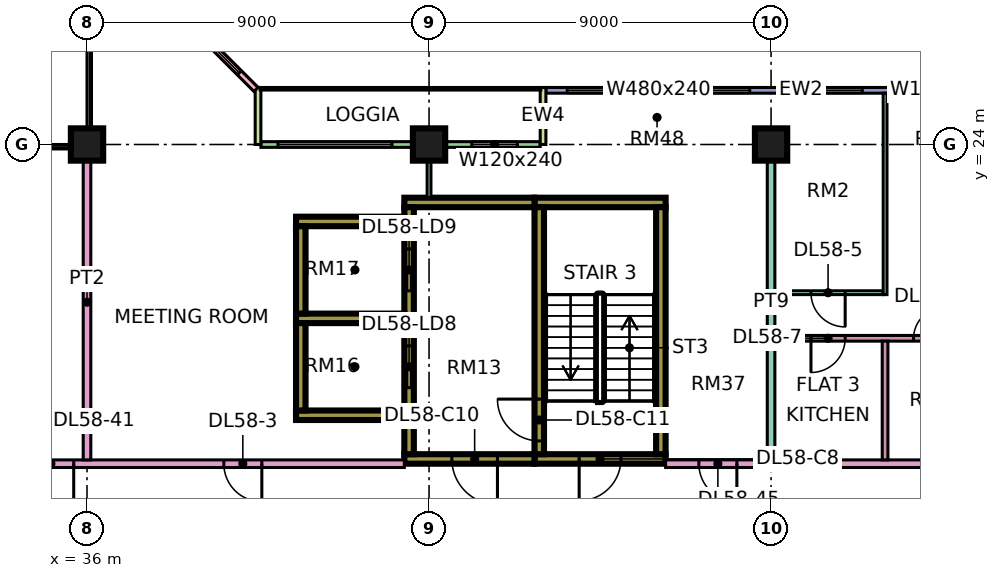
"""IFC4 building model, lengths in metres.
Left out: names, types, materials, properties, quantities, classifications, styles, units other than length and angle.
Written with IfcOpenShell. Run it as: python <this file> out.ifc"""

import sys

from ifc_helpers import new_model, si_unit, direction, frame, frame_2d, origin, origin_2d, place, context, subcontext, project, spatial, rectangle, extrude, element, fill, save


model = new_model("IFC4")
c1 = context("Model", 3, precision=1e-05, world=origin(), true_north=direction((0.0, 1.0)))
c2 = subcontext(c1, "Body", "Model", "MODEL_VIEW")
j1 = project(units=[si_unit("LENGTHUNIT", "METRE"), si_unit("PLANEANGLEUNIT", "RADIAN")], contexts=[c1])
p1 = place(None, origin())
s1 = spatial("IfcSite", under=j1, at=p1, CompositionType="ELEMENT")
p2 = place(p1, origin())
s2 = spatial("IfcBuilding", under=s1, at=p2, CompositionType="ELEMENT")
p3 = place(p2, frame((0.0, 0.0, 245.4)))
s3 = spatial("IfcBuildingStorey", under=s2, at=p3, CompositionType="ELEMENT", Elevation=245.4)
for number, where, z_axis, x_axis in (
    (1, (36.0, 24.0, 0.0), (0.0, 0.0, 1.0), (1.0, 0.0, 0.0)),
    (2, (45.0, 24.0, 0.0), (0.0, 0.0, 1.0), (1.0, 0.0, 0.0)),
    (3, (54.0, 24.0, 0.0), (0.0, 0.0, 1.0), (1.0, 0.0, 0.0)),
):
    element("IfcColumn", number, at=place(p3, frame(where, z_axis=z_axis, x_axis=x_axis)), inside=s3, PredefinedType="COLUMN", context=c2, shape_type="SweptSolid", body=[
        extrude(rectangle(XDim=0.85, YDim=0.85, at=origin_2d()), origin(), (0.0, 0.0, 1.0), 3.75),
    ])
p4 = place(p3, frame((47.775, 15.725, 0.0), z_axis=(0.0, 0.0, 1.0), x_axis=(1.0, 0.0, 0.0)))
e4 = element("IfcWall", 4, at=p4, inside=s3, PredefinedType="SHEAR", context=c2, shape_type="SweptSolid", body=[
    extrude(rectangle(XDim=3.45, YDim=0.25, at=frame_2d((1.725, 0.0))), origin(), (0.0, 0.0, 1.0), 3.75),
])
p5 = place(p4, frame((1.175, 0.0, 0.0)))
e5 = element("IfcOpeningElement", 5, at=p5, cuts=e4, PredefinedType="OPENING", context=c2, shape_type="SweptSolid", body=[
    extrude(rectangle(XDim=1.1, YDim=2.2, at=frame_2d((0.55, 1.1))), frame((0.0, 0.135, 0.0), z_axis=(0.0, -1.0, 0.0), x_axis=(1.0, 0.0, 0.0)), (0.0, 0.0, 1.0), 0.27),
])
p6 = place(p3, frame((47.775, 22.475, 0.0), z_axis=(0.0, 0.0, 1.0), x_axis=(1.0, 0.0, 0.0)))
e6 = element("IfcWall", 6, at=p6, inside=s3, PredefinedType="SHEAR", context=c2, shape_type="SweptSolid", body=[
    extrude(rectangle(XDim=3.45, YDim=0.25, at=frame_2d((1.725, 0.0))), origin(), (0.0, 0.0, 1.0), 3.75),
])
p7 = place(p3, frame((47.9, 15.85, 0.0), z_axis=(0.0, 0.0, 1.0), x_axis=(0.0, 1.0, 0.0)))
e7 = element("IfcWall", 7, at=p7, inside=s3, PredefinedType="SHEAR", context=c2, shape_type="SweptSolid", body=[
    extrude(rectangle(XDim=6.5, YDim=0.25, at=frame_2d((3.25, 0.0))), origin(), (0.0, 0.0, 1.0), 3.75),
])
p8 = place(p7, frame((0.35, 0.0, 0.0)))
e8 = element("IfcOpeningElement", 8, at=p8, cuts=e7, PredefinedType="OPENING", context=c2, shape_type="SweptSolid", body=[
    extrude(rectangle(XDim=1.1, YDim=2.2, at=frame_2d((0.55, 1.1))), frame((0.0, 0.135, 0.0), z_axis=(0.0, -1.0, 0.0), x_axis=(1.0, 0.0, 0.0)), (0.0, 0.0, 1.0), 0.27),
])
p9 = place(p3, frame((51.1, 15.85, 0.0), z_axis=(0.0, 0.0, 1.0), x_axis=(0.0, 1.0, 0.0)))
e9 = element("IfcWall", 9, at=p9, inside=s3, PredefinedType="SHEAR", context=c2, shape_type="SweptSolid", body=[
    extrude(rectangle(XDim=6.5, YDim=0.25, at=frame_2d((3.25, 0.0))), origin(), (0.0, 0.0, 1.0), 3.75),
])
p10 = place(p3, frame((44.35, 15.725, 0.0), z_axis=(0.0, 0.0, 1.0), x_axis=(1.0, 0.0, 0.0)))
e10 = element("IfcWall", 10, at=p10, inside=s3, PredefinedType="SHEAR", context=c2, shape_type="SweptSolid", body=[
    extrude(rectangle(XDim=3.425, YDim=0.25, at=frame_2d((1.712, 0.0))), origin(), (0.0, 0.0, 1.0), 3.75),
])
p11 = place(p10, frame((1.25, 0.0, 0.0)))
e11 = element("IfcOpeningElement", 11, at=p11, cuts=e10, PredefinedType="OPENING", context=c2, shape_type="SweptSolid", body=[
    extrude(rectangle(XDim=1.2, YDim=2.2, at=frame_2d((0.6, 1.1))), frame((0.0, 0.135, 0.0), z_axis=(0.0, -1.0, 0.0), x_axis=(1.0, 0.0, 0.0)), (0.0, 0.0, 1.0), 0.27),
])
p12 = place(p3, frame((44.35, 22.475, 0.0), z_axis=(0.0, 0.0, 1.0), x_axis=(1.0, 0.0, 0.0)))
e12 = element("IfcWall", 12, at=p12, inside=s3, PredefinedType="SHEAR", context=c2, shape_type="SweptSolid", body=[
    extrude(rectangle(XDim=3.425, YDim=0.25, at=frame_2d((1.712, 0.0))), origin(), (0.0, 0.0, 1.0), 3.75),
])
p13 = place(p3, frame((44.475, 15.85, 0.0), z_axis=(0.0, 0.0, 1.0), x_axis=(0.0, 1.0, 0.0)))
e13 = element("IfcWall", 13, at=p13, inside=s3, PredefinedType="SHEAR", context=c2, shape_type="SweptSolid", body=[
    extrude(rectangle(XDim=6.5, YDim=0.25, at=frame_2d((3.25, 0.0))), origin(), (0.0, 0.0, 1.0), 3.75),
])
p14 = place(p13, frame((1.75, 0.0, 0.0)))
e14 = element("IfcOpeningElement", 14, at=p14, cuts=e13, PredefinedType="OPENING", context=c2, shape_type="SweptSolid", body=[
    extrude(rectangle(XDim=1.1, YDim=2.2, at=frame_2d((0.55, 1.1))), frame((0.0, 0.135, 0.0), z_axis=(0.0, -1.0, 0.0), x_axis=(1.0, 0.0, 0.0)), (0.0, 0.0, 1.0), 0.27),
])
p15 = place(p13, frame((4.3, 0.0, 0.0)))
e15 = element("IfcOpeningElement", 15, at=p15, cuts=e13, PredefinedType="OPENING", context=c2, shape_type="SweptSolid", body=[
    extrude(rectangle(XDim=1.1, YDim=2.2, at=frame_2d((0.55, 1.1))), frame((0.0, 0.135, 0.0), z_axis=(0.0, -1.0, 0.0), x_axis=(1.0, 0.0, 0.0)), (0.0, 0.0, 1.0), 0.27),
])
for number, where, z_axis, x_axis in (
    (16, (41.5, 16.875, 0.0), (0.0, 0.0, 1.0), (1.0, 0.0, 0.0)),
    (17, (41.5, 19.425, 0.0), (0.0, 0.0, 1.0), (1.0, 0.0, 0.0)),
    (18, (41.5, 21.975, 0.0), (0.0, 0.0, 1.0), (1.0, 0.0, 0.0)),
):
    element("IfcWall", number, at=place(p3, frame(where, z_axis=z_axis, x_axis=x_axis)), inside=s3, PredefinedType="SHEAR", context=c2, shape_type="SweptSolid", body=[
        extrude(rectangle(XDim=2.85, YDim=0.25, at=frame_2d((1.425, 0.0))), origin(), (0.0, 0.0, 1.0), 3.75),
    ])
for number, where, z_axis, x_axis in (
    (19, (41.625, 17.0, 0.0), (0.0, 0.0, 1.0), (0.0, 1.0, 0.0)),
    (20, (41.625, 19.55, 0.0), (0.0, 0.0, 1.0), (0.0, 1.0, 0.0)),
):
    element("IfcWall", number, at=place(p3, frame(where, z_axis=z_axis, x_axis=x_axis)), inside=s3, PredefinedType="SHEAR", context=c2, shape_type="SweptSolid", body=[
        extrude(rectangle(XDim=2.3, YDim=0.25, at=frame_2d((1.15, 0.0))), origin(), (0.0, 0.0, 1.0), 3.75),
    ])
p16 = place(p3, frame((61.5, 25.425, 0.0), z_axis=(0.0, 0.0, 1.0), x_axis=(-1.0, 0.0, 0.0)))
e21 = element("IfcWall", 21, at=p16, inside=s3, PredefinedType="SOLIDWALL", context=c2, shape_type="SweptSolid", body=[
    extrude(rectangle(XDim=13.425, YDim=0.15, at=frame_2d((6.712, 0.0))), origin(), (0.0, 0.0, 1.0), 3.35),
])
p17 = place(p16, frame((0.3, 0.0, 0.45)))
e22 = element("IfcOpeningElement", 22, at=p17, cuts=e21, PredefinedType="OPENING", context=c2, shape_type="SweptSolid", body=[
    extrude(rectangle(XDim=0.9, YDim=2.4, at=frame_2d((0.45, 1.2))), frame((0.0, 0.085, 0.0), z_axis=(0.0, -1.0, 0.0), x_axis=(1.0, 0.0, 0.0)), (0.0, 0.0, 1.0), 0.17),
])
p18 = place(p16, frame((2.1, 0.0, 0.45)))
e23 = element("IfcOpeningElement", 23, at=p18, cuts=e21, PredefinedType="OPENING", context=c2, shape_type="SweptSolid", body=[
    extrude(rectangle(XDim=1.8, YDim=2.4, at=frame_2d((0.9, 1.2))), frame((0.0, 0.085, 0.0), z_axis=(0.0, -1.0, 0.0), x_axis=(1.0, 0.0, 0.0)), (0.0, 0.0, 1.0), 0.17),
])
p19 = place(p16, frame((5.1, 0.0, 0.45)))
e24 = element("IfcOpeningElement", 24, at=p19, cuts=e21, PredefinedType="OPENING", context=c2, shape_type="SweptSolid", body=[
    extrude(rectangle(XDim=1.8, YDim=2.4, at=frame_2d((0.9, 1.2))), frame((0.0, 0.085, 0.0), z_axis=(0.0, -1.0, 0.0), x_axis=(1.0, 0.0, 0.0)), (0.0, 0.0, 1.0), 0.17),
])
p20 = place(p16, frame((8.062, 0.0, 0.45)))
e25 = element("IfcOpeningElement", 25, at=p20, cuts=e21, PredefinedType="OPENING", context=c2, shape_type="SweptSolid", body=[
    extrude(rectangle(XDim=4.8, YDim=2.4, at=frame_2d((2.4, 1.2))), frame((0.0, 0.085, 0.0), z_axis=(0.0, -1.0, 0.0), x_axis=(1.0, 0.0, 0.0)), (0.0, 0.0, 1.0), 0.17),
])
p21 = place(p3, frame((47.925, 24.0, 0.0), z_axis=(0.0, 0.0, 1.0), x_axis=(-1.0, 0.0, 0.0)))
e26 = element("IfcWall", 26, at=p21, inside=s3, PredefinedType="SOLIDWALL", context=c2, shape_type="SweptSolid", body=[
    extrude(rectangle(XDim=7.35, YDim=0.15, at=frame_2d((3.675, 0.0))), origin(), (0.0, 0.0, 1.0), 3.35),
])
p22 = place(p21, frame((0.6, 0.0, 0.45)))
e27 = element("IfcOpeningElement", 27, at=p22, cuts=e26, PredefinedType="OPENING", context=c2, shape_type="SweptSolid", body=[
    extrude(rectangle(XDim=1.2, YDim=2.4, at=frame_2d((0.6, 1.2))), frame((0.0, 0.085, 0.0), z_axis=(0.0, -1.0, 0.0), x_axis=(1.0, 0.0, 0.0)), (0.0, 0.0, 1.0), 0.17),
])
p23 = place(p21, frame((3.9, 0.0, 0.45)))
e28 = element("IfcOpeningElement", 28, at=p23, cuts=e26, PredefinedType="OPENING", context=c2, shape_type="SweptSolid", body=[
    extrude(rectangle(XDim=3.0, YDim=2.4, at=frame_2d((1.5, 1.2))), frame((0.0, 0.085, 0.0), z_axis=(0.0, -1.0, 0.0), x_axis=(1.0, 0.0, 0.0)), (0.0, 0.0, 1.0), 0.17),
])
for number, where, z_axis, x_axis in (
    (29, (48.0, 25.5, 0.0), (0.0, 0.0, 1.0), (0.0, -1.0, 0.0)),
    (30, (40.5, 25.5, 0.0), (0.0, 0.0, 1.0), (0.0, -1.0, 0.0)),
):
    element("IfcWall", number, at=place(p3, frame(where, z_axis=z_axis, x_axis=x_axis)), inside=s3, PredefinedType="SOLIDWALL", context=c2, shape_type="SweptSolid", body=[
        extrude(rectangle(XDim=1.5, YDim=0.15, at=frame_2d((0.75, 0.0))), origin(), (0.0, 0.0, 1.0), 3.35),
    ])
p24 = place(p3, frame((40.447, 25.447, 0.0), z_axis=(0.0, 0.0, 1.0), x_axis=(-0.707106781187, 0.707106781187, 0.0)))
e31 = element("IfcWall", 31, at=p24, inside=s3, PredefinedType="SOLIDWALL", context=c2, shape_type="SweptSolid", body=[
    extrude(rectangle(XDim=4.243, YDim=0.15, at=frame_2d((2.121, 0.0))), origin(), (0.0, 0.0, 1.0), 3.35),
])
p25 = place(p24, frame((0.621, 0.0, 0.45)))
e32 = element("IfcOpeningElement", 32, at=p25, cuts=e31, PredefinedType="OPENING", context=c2, shape_type="SweptSolid", body=[
    extrude(rectangle(XDim=3.0, YDim=2.4, at=frame_2d((1.5, 1.2))), frame((0.0, 0.085, 0.0), z_axis=(0.0, -1.0, 0.0), x_axis=(1.0, 0.0, 0.0)), (0.0, 0.0, 1.0), 0.17),
])
p26 = place(p3, frame((34.0, 15.6, 0.0), z_axis=(0.0, 0.0, 1.0), x_axis=(1.0, 0.0, 0.0)))
e33 = element("IfcWall", 33, at=p26, inside=s3, PredefinedType="PARTITIONING", context=c2, shape_type="SweptSolid", body=[
    extrude(rectangle(XDim=10.35, YDim=0.2, at=frame_2d((5.175, 0.0))), origin(), (0.0, 0.0, 1.0), 3.35),
])
p27 = place(p26, frame((5.6, 0.0, 0.0)))
e34 = element("IfcOpeningElement", 34, at=p27, cuts=e33, PredefinedType="OPENING", context=c2, shape_type="SweptSolid", body=[
    extrude(rectangle(XDim=1.0, YDim=2.1, at=frame_2d((0.5, 1.05))), frame((0.0, 0.11, 0.0), z_axis=(0.0, -1.0, 0.0), x_axis=(1.0, 0.0, 0.0)), (0.0, 0.0, 1.0), 0.22),
])
p28 = place(p26, frame((0.45, 0.0, 0.0)))
e35 = element("IfcOpeningElement", 35, at=p28, cuts=e33, PredefinedType="OPENING", context=c2, shape_type="SweptSolid", body=[
    extrude(rectangle(XDim=1.2, YDim=2.1, at=frame_2d((0.6, 1.05))), frame((0.0, 0.11, 0.0), z_axis=(0.0, -1.0, 0.0), x_axis=(1.0, 0.0, 0.0)), (0.0, 0.0, 1.0), 0.22),
])
p29 = place(p3, frame((36.0, 15.7, 0.0), z_axis=(0.0, 0.0, 1.0), x_axis=(0.0, 1.0, 0.0)))
e36 = element("IfcWall", 36, at=p29, inside=s3, PredefinedType="PARTITIONING", context=c2, shape_type="SweptSolid", body=[
    extrude(rectangle(XDim=8.3, YDim=0.2, at=frame_2d((4.15, 0.0))), origin(), (0.0, 0.0, 1.0), 3.35),
])
p30 = place(p3, frame((45.0, 22.6, 0.0), z_axis=(0.0, 0.0, 1.0), x_axis=(0.0, 1.0, 0.0)))
e37 = element("IfcWall", 37, at=p30, inside=s3, PredefinedType="PARTITIONING", context=c2, shape_type="SweptSolid", body=[
    extrude(rectangle(XDim=1.326, YDim=0.1, at=frame_2d((0.663, 0.0))), origin(), (0.0, 0.0, 1.0), 3.35),
])
p31 = place(p3, frame((51.225, 15.6, 0.0), z_axis=(0.0, 0.0, 1.0), x_axis=(1.0, 0.0, 0.0)))
e38 = element("IfcWall", 38, at=p31, inside=s3, PredefinedType="PARTITIONING", context=c2, shape_type="SweptSolid", body=[
    extrude(rectangle(XDim=11.701, YDim=0.2, at=frame_2d((5.851, 0.0))), origin(), (0.0, 0.0, 1.0), 3.35),
])
p32 = place(p31, frame((9.425, 0.0, 0.0)))
e39 = element("IfcOpeningElement", 39, at=p32, cuts=e38, PredefinedType="OPENING", context=c2, shape_type="SweptSolid", body=[
    extrude(rectangle(XDim=1.0, YDim=2.1, at=frame_2d((0.5, 1.05))), frame((0.0, 0.11, 0.0), z_axis=(0.0, -1.0, 0.0), x_axis=(1.0, 0.0, 0.0)), (0.0, 0.0, 1.0), 0.22),
])
p33 = place(p31, frame((0.875, 0.0, 0.0)))
e40 = element("IfcOpeningElement", 40, at=p33, cuts=e38, PredefinedType="OPENING", context=c2, shape_type="SweptSolid", body=[
    extrude(rectangle(XDim=1.0, YDim=2.1, at=frame_2d((0.5, 1.05))), frame((0.0, 0.11, 0.0), z_axis=(0.0, -1.0, 0.0), x_axis=(1.0, 0.0, 0.0)), (0.0, 0.0, 1.0), 0.22),
])
p34 = place(p3, frame((54.0, 15.7, 0.0), z_axis=(0.0, 0.0, 1.0), x_axis=(0.0, 1.0, 0.0)))
e41 = element("IfcWall", 41, at=p34, inside=s3, PredefinedType="PARTITIONING", context=c2, shape_type="SweptSolid", body=[
    extrude(rectangle(XDim=8.3, YDim=0.2, at=frame_2d((4.15, 0.0))), origin(), (0.0, 0.0, 1.0), 3.35),
])
p35 = place(p3, frame((54.1, 18.9, 0.0), z_axis=(0.0, 0.0, 1.0), x_axis=(1.0, 0.0, 0.0)))
e42 = element("IfcWall", 42, at=p35, inside=s3, PredefinedType="PARTITIONING", context=c2, shape_type="SweptSolid", body=[
    extrude(rectangle(XDim=5.375, YDim=0.15, at=frame_2d((2.688, 0.0))), origin(), (0.0, 0.0, 1.0), 3.35),
])
p36 = place(p35, frame((3.65, 0.0, 0.0)))
e43 = element("IfcOpeningElement", 43, at=p36, cuts=e42, PredefinedType="OPENING", context=c2, shape_type="SweptSolid", body=[
    extrude(rectangle(XDim=0.8, YDim=2.1, at=frame_2d((0.4, 1.05))), frame((0.0, 0.085, 0.0), z_axis=(0.0, -1.0, 0.0), x_axis=(1.0, 0.0, 0.0)), (0.0, 0.0, 1.0), 0.17),
])
p37 = place(p35, frame((0.95, 0.0, 0.0)))
e44 = element("IfcOpeningElement", 44, at=p37, cuts=e42, PredefinedType="OPENING", context=c2, shape_type="SweptSolid", body=[
    extrude(rectangle(XDim=0.9, YDim=2.1, at=frame_2d((0.45, 1.05))), frame((0.0, 0.085, 0.0), z_axis=(0.0, -1.0, 0.0), x_axis=(1.0, 0.0, 0.0)), (0.0, 0.0, 1.0), 0.17),
])
p38 = place(p3, frame((54.1, 20.1, 0.0), z_axis=(0.0, 0.0, 1.0), x_axis=(1.0, 0.0, 0.0)))
e45 = element("IfcWall", 45, at=p38, inside=s3, PredefinedType="PARTITIONING", context=c2, shape_type="SweptSolid", body=[
    extrude(rectangle(XDim=2.85, YDim=0.1, at=frame_2d((1.425, 0.0))), origin(), (0.0, 0.0, 1.0), 3.35),
])
p39 = place(p38, frame((0.95, 0.0, 0.0)))
e46 = element("IfcOpeningElement", 46, at=p39, cuts=e45, PredefinedType="OPENING", context=c2, shape_type="SweptSolid", body=[
    extrude(rectangle(XDim=0.9, YDim=2.1, at=frame_2d((0.45, 1.05))), frame((0.0, 0.06, 0.0), z_axis=(0.0, -1.0, 0.0), x_axis=(1.0, 0.0, 0.0)), (0.0, 0.0, 1.0), 0.12),
])
p40 = place(p3, frame((57.0, 15.7, 0.0), z_axis=(0.0, 0.0, 1.0), x_axis=(0.0, 1.0, 0.0)))
e47 = element("IfcWall", 47, at=p40, inside=s3, PredefinedType="PARTITIONING", context=c2, shape_type="SweptSolid", body=[
    extrude(rectangle(XDim=3.125, YDim=0.15, at=frame_2d((1.562, 0.0))), origin(), (0.0, 0.0, 1.0), 3.35),
])
p41 = place(p3, frame((57.0, 20.05, 0.0), z_axis=(0.0, 0.0, 1.0), x_axis=(0.0, 1.0, 0.0)))
e48 = element("IfcWall", 48, at=p41, inside=s3, PredefinedType="PARTITIONING", context=c2, shape_type="SweptSolid", body=[
    extrude(rectangle(XDim=5.3, YDim=0.1, at=frame_2d((2.65, 0.0))), origin(), (0.0, 0.0, 1.0), 3.35),
])
p42 = place(p18, origin())
e49 = element("IfcWindow", 49, at=p42, inside=s3, PartitioningType="SINGLE_PANEL", PredefinedType="WINDOW", context=c2, shape_type="SweptSolid", body=[
    extrude(rectangle(XDim=1.8, YDim=2.4, at=frame_2d((0.9, 1.2))), frame((0.0, 0.03, 0.0), z_axis=(0.0, -1.0, 0.0), x_axis=(1.0, 0.0, 0.0)), (0.0, 0.0, 1.0), 0.06),
])
fill(e23, e49)
p43 = place(p19, origin())
e50 = element("IfcWindow", 50, at=p43, inside=s3, PartitioningType="SINGLE_PANEL", PredefinedType="WINDOW", context=c2, shape_type="SweptSolid", body=[
    extrude(rectangle(XDim=1.8, YDim=2.4, at=frame_2d((0.9, 1.2))), frame((0.0, 0.03, 0.0), z_axis=(0.0, -1.0, 0.0), x_axis=(1.0, 0.0, 0.0)), (0.0, 0.0, 1.0), 0.06),
])
fill(e24, e50)
p44 = place(p20, origin())
e51 = element("IfcWindow", 51, at=p44, inside=s3, PartitioningType="SINGLE_PANEL", PredefinedType="WINDOW", context=c2, shape_type="SweptSolid", body=[
    extrude(rectangle(XDim=4.8, YDim=2.4, at=frame_2d((2.4, 1.2))), frame((0.0, 0.03, 0.0), z_axis=(0.0, -1.0, 0.0), x_axis=(1.0, 0.0, 0.0)), (0.0, 0.0, 1.0), 0.06),
])
fill(e25, e51)
p45 = place(p22, origin())
e52 = element("IfcWindow", 52, at=p45, inside=s3, PartitioningType="SINGLE_PANEL", PredefinedType="WINDOW", context=c2, shape_type="SweptSolid", body=[
    extrude(rectangle(XDim=1.2, YDim=2.4, at=frame_2d((0.6, 1.2))), frame((0.0, 0.03, 0.0), z_axis=(0.0, -1.0, 0.0), x_axis=(1.0, 0.0, 0.0)), (0.0, 0.0, 1.0), 0.06),
])
fill(e27, e52)
p46 = place(p23, origin())
e53 = element("IfcWindow", 53, at=p46, inside=s3, PartitioningType="SINGLE_PANEL", PredefinedType="WINDOW", context=c2, shape_type="SweptSolid", body=[
    extrude(rectangle(XDim=3.0, YDim=2.4, at=frame_2d((1.5, 1.2))), frame((0.0, 0.03, 0.0), z_axis=(0.0, -1.0, 0.0), x_axis=(1.0, 0.0, 0.0)), (0.0, 0.0, 1.0), 0.06),
])
fill(e28, e53)
p47 = place(p25, origin())
e54 = element("IfcWindow", 54, at=p47, inside=s3, PartitioningType="SINGLE_PANEL", PredefinedType="WINDOW", context=c2, shape_type="SweptSolid", body=[
    extrude(rectangle(XDim=3.0, YDim=2.4, at=frame_2d((1.5, 1.2))), frame((0.0, 0.03, 0.0), z_axis=(0.0, -1.0, 0.0), x_axis=(1.0, 0.0, 0.0)), (0.0, 0.0, 1.0), 0.06),
])
fill(e32, e54)
p48 = place(p5, frame((1.1, 0.0, 0.0), z_axis=(0.0, 0.0, 1.0), x_axis=(-1.0, 0.0, 0.0)))
e55 = element("IfcDoor", 55, at=p48, inside=s3, OperationType="SINGLE_SWING_LEFT", PredefinedType="DOOR", context=c2, shape_type="SweptSolid", body=[
    extrude(rectangle(XDim=1.1, YDim=2.2, at=frame_2d((0.55, 1.1))), frame((0.0, 0.025, 0.0), z_axis=(0.0, -1.0, 0.0), x_axis=(1.0, 0.0, 0.0)), (0.0, 0.0, 1.0), 0.05),
])
fill(e5, e55)
p49 = place(p11, origin())
e56 = element("IfcDoor", 56, at=p49, inside=s3, OperationType="SINGLE_SWING_RIGHT", PredefinedType="DOOR", context=c2, shape_type="SweptSolid", body=[
    extrude(rectangle(XDim=1.2, YDim=2.2, at=frame_2d((0.6, 1.1))), frame((0.0, 0.025, 0.0), z_axis=(0.0, -1.0, 0.0), x_axis=(1.0, 0.0, 0.0)), (0.0, 0.0, 1.0), 0.05),
])
fill(e11, e56)
p50 = place(p8, frame((1.1, 0.0, 0.0), z_axis=(0.0, 0.0, 1.0), x_axis=(-1.0, 0.0, 0.0)))
e57 = element("IfcDoor", 57, at=p50, inside=s3, OperationType="SINGLE_SWING_RIGHT", PredefinedType="DOOR", context=c2, shape_type="SweptSolid", body=[
    extrude(rectangle(XDim=1.1, YDim=2.2, at=frame_2d((0.55, 1.1))), frame((0.0, 0.025, 0.0), z_axis=(0.0, -1.0, 0.0), x_axis=(1.0, 0.0, 0.0)), (0.0, 0.0, 1.0), 0.05),
])
fill(e8, e57)
p51 = place(p14, origin())
e58 = element("IfcDoor", 58, at=p51, inside=s3, OperationType="DOUBLE_DOOR_SLIDING", PredefinedType="DOOR", context=c2, shape_type="SweptSolid", body=[
    extrude(rectangle(XDim=1.1, YDim=2.2, at=frame_2d((0.55, 1.1))), frame((0.0, 0.025, 0.0), z_axis=(0.0, -1.0, 0.0), x_axis=(1.0, 0.0, 0.0)), (0.0, 0.0, 1.0), 0.05),
])
fill(e14, e58)
p52 = place(p15, origin())
e59 = element("IfcDoor", 59, at=p52, inside=s3, OperationType="DOUBLE_DOOR_SLIDING", PredefinedType="DOOR", context=c2, shape_type="SweptSolid", body=[
    extrude(rectangle(XDim=1.1, YDim=2.2, at=frame_2d((0.55, 1.1))), frame((0.0, 0.025, 0.0), z_axis=(0.0, -1.0, 0.0), x_axis=(1.0, 0.0, 0.0)), (0.0, 0.0, 1.0), 0.05),
])
fill(e15, e59)
p53 = place(p27, origin())
e60 = element("IfcDoor", 60, at=p53, inside=s3, OperationType="SINGLE_SWING_RIGHT", PredefinedType="DOOR", context=c2, shape_type="SweptSolid", body=[
    extrude(rectangle(XDim=1.0, YDim=2.1, at=frame_2d((0.5, 1.05))), frame((0.0, 0.025, 0.0), z_axis=(0.0, -1.0, 0.0), x_axis=(1.0, 0.0, 0.0)), (0.0, 0.0, 1.0), 0.05),
])
fill(e34, e60)
p54 = place(p36, frame((0.8, 0.0, 0.0), z_axis=(0.0, 0.0, 1.0), x_axis=(-1.0, 0.0, 0.0)))
e61 = element("IfcDoor", 61, at=p54, inside=s3, OperationType="SINGLE_SWING_RIGHT", PredefinedType="DOOR", context=c2, shape_type="SweptSolid", body=[
    extrude(rectangle(XDim=0.8, YDim=2.1, at=frame_2d((0.4, 1.05))), frame((0.0, 0.025, 0.0), z_axis=(0.0, -1.0, 0.0), x_axis=(1.0, 0.0, 0.0)), (0.0, 0.0, 1.0), 0.05),
])
fill(e43, e61)
p55 = place(p39, origin())
e62 = element("IfcDoor", 62, at=p55, inside=s3, OperationType="SINGLE_SWING_RIGHT", PredefinedType="DOOR", context=c2, shape_type="SweptSolid", body=[
    extrude(rectangle(XDim=0.9, YDim=2.1, at=frame_2d((0.45, 1.05))), frame((0.0, 0.025, 0.0), z_axis=(0.0, -1.0, 0.0), x_axis=(1.0, 0.0, 0.0)), (0.0, 0.0, 1.0), 0.05),
])
fill(e46, e62)
p56 = place(p37, frame((0.9, 0.0, 0.0), z_axis=(0.0, 0.0, 1.0), x_axis=(-1.0, 0.0, 0.0)))
e63 = element("IfcDoor", 63, at=p56, inside=s3, OperationType="SINGLE_SWING_LEFT", PredefinedType="DOOR", context=c2, shape_type="SweptSolid", body=[
    extrude(rectangle(XDim=0.9, YDim=2.1, at=frame_2d((0.45, 1.05))), frame((0.0, 0.025, 0.0), z_axis=(0.0, -1.0, 0.0), x_axis=(1.0, 0.0, 0.0)), (0.0, 0.0, 1.0), 0.05),
])
fill(e44, e63)
p57 = place(p28, origin())
e64 = element("IfcDoor", 64, at=p57, inside=s3, OperationType="SINGLE_SWING_RIGHT", PredefinedType="DOOR", context=c2, shape_type="SweptSolid", body=[
    extrude(rectangle(XDim=1.2, YDim=2.1, at=frame_2d((0.6, 1.05))), frame((0.0, 0.025, 0.0), z_axis=(0.0, -1.0, 0.0), x_axis=(1.0, 0.0, 0.0)), (0.0, 0.0, 1.0), 0.05),
])
fill(e35, e64)
p58 = place(p33, origin())
e65 = element("IfcDoor", 65, at=p58, inside=s3, OperationType="SINGLE_SWING_RIGHT", PredefinedType="DOOR", context=c2, shape_type="SweptSolid", body=[
    extrude(rectangle(XDim=1.0, YDim=2.1, at=frame_2d((0.5, 1.05))), frame((0.0, 0.025, 0.0), z_axis=(0.0, -1.0, 0.0), x_axis=(1.0, 0.0, 0.0)), (0.0, 0.0, 1.0), 0.05),
])
fill(e40, e65)
save(model, sys.argv[1])
